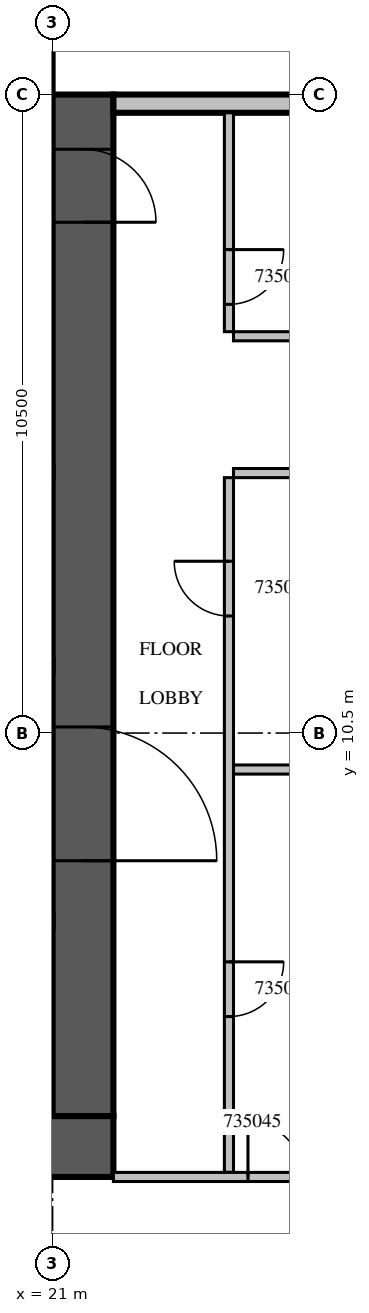
"""IFC4 building model, lengths in metres.
Left out: names, types, materials, properties, quantities, classifications, styles, units other than length and angle.
Written with IfcOpenShell. Run it as: python <this file> out.ifc"""

import sys

from ifc_helpers import new_model, si_unit, direction, frame, frame_2d, origin, place, context, subcontext, project, spatial, rectangle, extrude, source, transform, mapped, element, fill, save


model = new_model("IFC4")
c1 = context("Model", 3, precision=1e-05, world=origin(), true_north=direction((0.0, 1.0)))
c2 = subcontext(c1, "Body", "Model", "MODEL_VIEW")
j1 = project(units=[si_unit("LENGTHUNIT", "METRE"), si_unit("PLANEANGLEUNIT", "RADIAN")], contexts=[c1])
p1 = place(None, origin())
s1 = spatial("IfcSite", under=j1, at=p1, CompositionType="ELEMENT")
p2 = place(p1, origin())
s2 = spatial("IfcBuilding", under=s1, at=p2, CompositionType="ELEMENT")
p3 = place(p2, frame((0.0, 0.0, 158.1)))
s3 = spatial("IfcBuildingStorey", under=s2, at=p3, CompositionType="ELEMENT", Elevation=158.1)
m1 = source(origin(), c2, "Body", "SweptSolid", [
    extrude(rectangle(XDim=16.8, YDim=1.0, at=frame_2d((8.4, 0.0))), origin(), (0.0, 0.0, 1.0), 4.2),
])
p4 = place(p3, frame((21.5, 4.2, 0.0), z_axis=(0.0, 0.0, 1.0), x_axis=(0.0, 1.0, 0.0)))
e1 = element("IfcWall", 1, at=p4, inside=s3, PredefinedType="SHEAR", context=c2, shape_type="MappedRepresentation", body=[
    mapped(m1, transform((0.0, 0.0, 0.0), scale=1.0)),
])
m2 = source(origin(), c2, "Body", "SweptSolid", [
    extrude(rectangle(XDim=2.2, YDim=2.1, at=frame_2d((1.1, 1.05))), frame((0.0, 0.51, 0.0), z_axis=(0.0, -1.0, 0.0), x_axis=(1.0, 0.0, 0.0)), (0.0, 0.0, 1.0), 1.02),
])
p5 = place(p4, frame((4.2, 0.0, 0.0)))
e2 = element("IfcOpeningElement", 2, at=p5, cuts=e1, PredefinedType="OPENING", context=c2, shape_type="MappedRepresentation", body=[
    mapped(m2, transform((0.0, 0.0, 0.0), scale=1.0)),
])
m3 = source(origin(), c2, "Body", "SweptSolid", [
    extrude(rectangle(XDim=1.2, YDim=2.1, at=frame_2d((0.6, 1.05))), frame((0.0, 0.51, 0.0), z_axis=(0.0, -1.0, 0.0), x_axis=(1.0, 0.0, 0.0)), (0.0, 0.0, 1.0), 1.02),
])
p6 = place(p4, frame((14.7, 0.0, 0.0)))
e3 = element("IfcOpeningElement", 3, at=p6, cuts=e1, PredefinedType="OPENING", context=c2, shape_type="MappedRepresentation", body=[
    mapped(m3, transform((0.0, 0.0, 0.0), scale=1.0)),
])
m4 = source(origin(), c2, "Body", "SweptSolid", [
    extrude(rectangle(XDim=17.8, YDim=1.0, at=frame_2d((8.9, 0.0))), origin(), (0.0, 0.0, 1.0), 4.2),
])
p7 = place(p3, frame((4.2, 3.7, 0.0), z_axis=(0.0, 0.0, 1.0), x_axis=(1.0, 0.0, 0.0)))
e4 = element("IfcWall", 4, at=p7, inside=s3, PredefinedType="SHEAR", context=c2, shape_type="MappedRepresentation", body=[
    mapped(m4, transform((0.0, 0.0, 0.0), scale=1.0)),
])
m5 = source(origin(), c2, "Body", "SweptSolid", [
    extrude(rectangle(XDim=6.875, YDim=0.3, at=frame_2d((3.438, 0.0))), origin(), (0.0, 0.0, 1.0), 3.8),
])
p8 = place(p3, frame((28.875, 20.85, 0.0), z_axis=(0.0, 0.0, 1.0), x_axis=(-1.0, 0.0, 0.0)))
e5 = element("IfcWall", 5, at=p8, inside=s3, PredefinedType="STANDARD", context=c2, shape_type="MappedRepresentation", body=[
    mapped(m5, transform((0.0, 0.0, 0.0), scale=1.0)),
])
m6 = source(origin(), c2, "Body", "SweptSolid", [
    extrude(rectangle(XDim=2.4, YDim=2.7, at=frame_2d((1.2, 1.35))), frame((0.0, 0.16, 0.0), z_axis=(0.0, -1.0, 0.0), x_axis=(1.0, 0.0, 0.0)), (0.0, 0.0, 1.0), 0.32),
])
p9 = place(p8, frame((0.375, 0.0, 0.6)))
e6 = element("IfcOpeningElement", 6, at=p9, cuts=e5, PredefinedType="OPENING", context=c2, shape_type="MappedRepresentation", body=[
    mapped(m6, transform((0.0, 0.0, 0.0), scale=1.0)),
])
m7 = source(origin(), c2, "Body", "SweptSolid", [
    extrude(rectangle(XDim=11.425, YDim=0.15, at=frame_2d((5.713, 0.0))), origin(), (0.0, 0.0, 1.0), 3.8),
])
p10 = place(p3, frame((23.9, 14.7, 0.0), z_axis=(0.0, 0.0, 1.0), x_axis=(0.0, -1.0, 0.0)))
e7 = element("IfcWall", 7, at=p10, inside=s3, PredefinedType="PARTITIONING", context=c2, shape_type="MappedRepresentation", body=[
    mapped(m7, transform((0.0, 0.0, 0.0), scale=1.0)),
])
m8 = source(origin(), c2, "Body", "SweptSolid", [
    extrude(rectangle(XDim=0.9, YDim=2.1, at=frame_2d((0.45, 1.05))), frame((0.0, 0.085, 0.0), z_axis=(0.0, -1.0, 0.0), x_axis=(1.0, 0.0, 0.0)), (0.0, 0.0, 1.0), 0.17),
])
p11 = place(p10, frame((7.963, 0.0, 0.0)))
e8 = element("IfcOpeningElement", 8, at=p11, cuts=e7, PredefinedType="OPENING", context=c2, shape_type="MappedRepresentation", body=[
    mapped(m8, transform((0.0, 0.0, 0.0), scale=1.0)),
])
p12 = place(p10, frame((1.375, 0.0, 0.0)))
e9 = element("IfcOpeningElement", 9, at=p12, cuts=e7, PredefinedType="OPENING", context=c2, shape_type="MappedRepresentation", body=[
    mapped(m8, transform((0.0, 0.0, 0.0), scale=1.0)),
])
m9 = source(origin(), c2, "Body", "SweptSolid", [
    extrude(rectangle(XDim=3.6, YDim=0.15, at=frame_2d((1.8, 0.0))), origin(), (0.0, 0.0, 1.0), 3.8),
])
p13 = place(p3, frame((23.9, 20.7, 0.0), z_axis=(0.0, 0.0, 1.0), x_axis=(0.0, -1.0, 0.0)))
e10 = element("IfcWall", 10, at=p13, inside=s3, PredefinedType="PARTITIONING", context=c2, shape_type="MappedRepresentation", body=[
    mapped(m9, transform((0.0, 0.0, 0.0), scale=1.0)),
])
p14 = place(p13, frame((2.25, 0.0, 0.0)))
e11 = element("IfcOpeningElement", 11, at=p14, cuts=e10, PredefinedType="OPENING", context=c2, shape_type="MappedRepresentation", body=[
    mapped(m8, transform((0.0, 0.0, 0.0), scale=1.0)),
])
m10 = source(origin(), c2, "Body", "SweptSolid", [
    extrude(rectangle(XDim=5.35, YDim=0.15, at=frame_2d((2.675, 0.0))), origin(), (0.0, 0.0, 1.0), 3.8),
])
for number, where, z_axis, x_axis in (
    (12, (29.325, 9.9, 0.0), (0.0, 0.0, 1.0), (-1.0, 0.0, 0.0)),
    (13, (29.325, 14.775, 0.0), (0.0, 0.0, 1.0), (-1.0, 0.0, 0.0)),
    (14, (23.975, 17.025, 0.0), (0.0, 0.0, 1.0), (1.0, 0.0, 0.0)),
):
    element("IfcWall", number, at=place(p3, frame(where, z_axis=z_axis, x_axis=x_axis)), inside=s3, PredefinedType="PARTITIONING", context=c2, shape_type="MappedRepresentation", body=[
        mapped(m10, transform((0.0, 0.0, 0.0), scale=1.0)),
    ])
m11 = source(origin(), c2, "Body", "SweptSolid", [
    extrude(rectangle(XDim=7.325, YDim=0.15, at=frame_2d((3.663, 0.0))), origin(), (0.0, 0.0, 1.0), 3.8),
])
p15 = place(p3, frame((22.0, 3.2, 0.0), z_axis=(0.0, 0.0, 1.0), x_axis=(1.0, 0.0, 0.0)))
e15 = element("IfcWall", 15, at=p15, inside=s3, PredefinedType="PARTITIONING", context=c2, shape_type="MappedRepresentation", body=[
    mapped(m11, transform((0.0, 0.0, 0.0), scale=1.0)),
])
m12 = source(origin(), c2, "Body", "SweptSolid", [
    extrude(rectangle(XDim=1.0, YDim=2.1, at=frame_2d((0.5, 1.05))), frame((0.0, 0.085, 0.0), z_axis=(0.0, -1.0, 0.0), x_axis=(1.0, 0.0, 0.0)), (0.0, 0.0, 1.0), 0.17),
])
p16 = place(p15, frame((3.2, 0.0, 0.0)))
e16 = element("IfcOpeningElement", 16, at=p16, cuts=e15, PredefinedType="OPENING", context=c2, shape_type="MappedRepresentation", body=[
    mapped(m12, transform((0.0, 0.0, 0.0), scale=1.0)),
])
p17 = place(p15, frame((2.213, 0.0, 0.0)))
e17 = element("IfcOpeningElement", 17, at=p17, cuts=e15, PredefinedType="OPENING", context=c2, shape_type="MappedRepresentation", body=[
    mapped(m8, transform((0.0, 0.0, 0.0), scale=1.0)),
])
m13 = source(origin(), c2, "Body", "SweptSolid", [
    extrude(rectangle(XDim=2.2, YDim=2.1, at=frame_2d((1.1, 1.05))), frame((0.0, 0.025, 0.0), z_axis=(0.0, -1.0, 0.0), x_axis=(1.0, 0.0, 0.0)), (0.0, 0.0, 1.0), 0.05),
])
p18 = place(p5, origin())
e18 = element("IfcDoor", 18, at=p18, inside=s3, OperationType="DOUBLE_DOOR_SINGLE_SWING", PredefinedType="DOOR", context=c2, shape_type="MappedRepresentation", body=[
    mapped(m13, transform((0.0, 0.0, 0.0), scale=1.0)),
])
fill(e2, e18)
m14 = source(origin(), c2, "Body", "SweptSolid", [
    extrude(rectangle(XDim=1.2, YDim=2.1, at=frame_2d((0.6, 1.05))), frame((0.0, 0.025, 0.0), z_axis=(0.0, -1.0, 0.0), x_axis=(1.0, 0.0, 0.0)), (0.0, 0.0, 1.0), 0.05),
])
p19 = place(p6, origin())
e19 = element("IfcDoor", 19, at=p19, inside=s3, OperationType="SINGLE_SWING_RIGHT", PredefinedType="DOOR", context=c2, shape_type="MappedRepresentation", body=[
    mapped(m14, transform((0.0, 0.0, 0.0), scale=1.0)),
])
fill(e3, e19)
m15 = source(origin(), c2, "Body", "SweptSolid", [
    extrude(rectangle(XDim=0.9, YDim=2.1, at=frame_2d((0.45, 1.05))), frame((0.0, 0.025, 0.0), z_axis=(0.0, -1.0, 0.0), x_axis=(1.0, 0.0, 0.0)), (0.0, 0.0, 1.0), 0.05),
])
p20 = place(p11, origin())
e20 = element("IfcDoor", 20, at=p20, inside=s3, OperationType="SINGLE_SWING_LEFT", PredefinedType="DOOR", context=c2, shape_type="MappedRepresentation", body=[
    mapped(m15, transform((0.0, 0.0, 0.0), scale=1.0)),
])
fill(e8, e20)
p21 = place(p12, origin())
e21 = element("IfcDoor", 21, at=p21, inside=s3, OperationType="SINGLE_SWING_RIGHT", PredefinedType="DOOR", context=c2, shape_type="MappedRepresentation", body=[
    mapped(m15, transform((0.0, 0.0, 0.0), scale=1.0)),
])
fill(e9, e21)
p22 = place(p14, origin())
e22 = element("IfcDoor", 22, at=p22, inside=s3, OperationType="SINGLE_SWING_LEFT", PredefinedType="DOOR", context=c2, shape_type="MappedRepresentation", body=[
    mapped(m15, transform((0.0, 0.0, 0.0), scale=1.0)),
])
fill(e11, e22)
p23 = place(p17, origin())
e23 = element("IfcDoor", 23, at=p23, inside=s3, OperationType="SINGLE_SWING_LEFT", PredefinedType="DOOR", context=c2, shape_type="MappedRepresentation", body=[
    mapped(m15, transform((0.0, 0.0, 0.0), scale=1.0)),
])
fill(e17, e23)
save(model, sys.argv[1])
